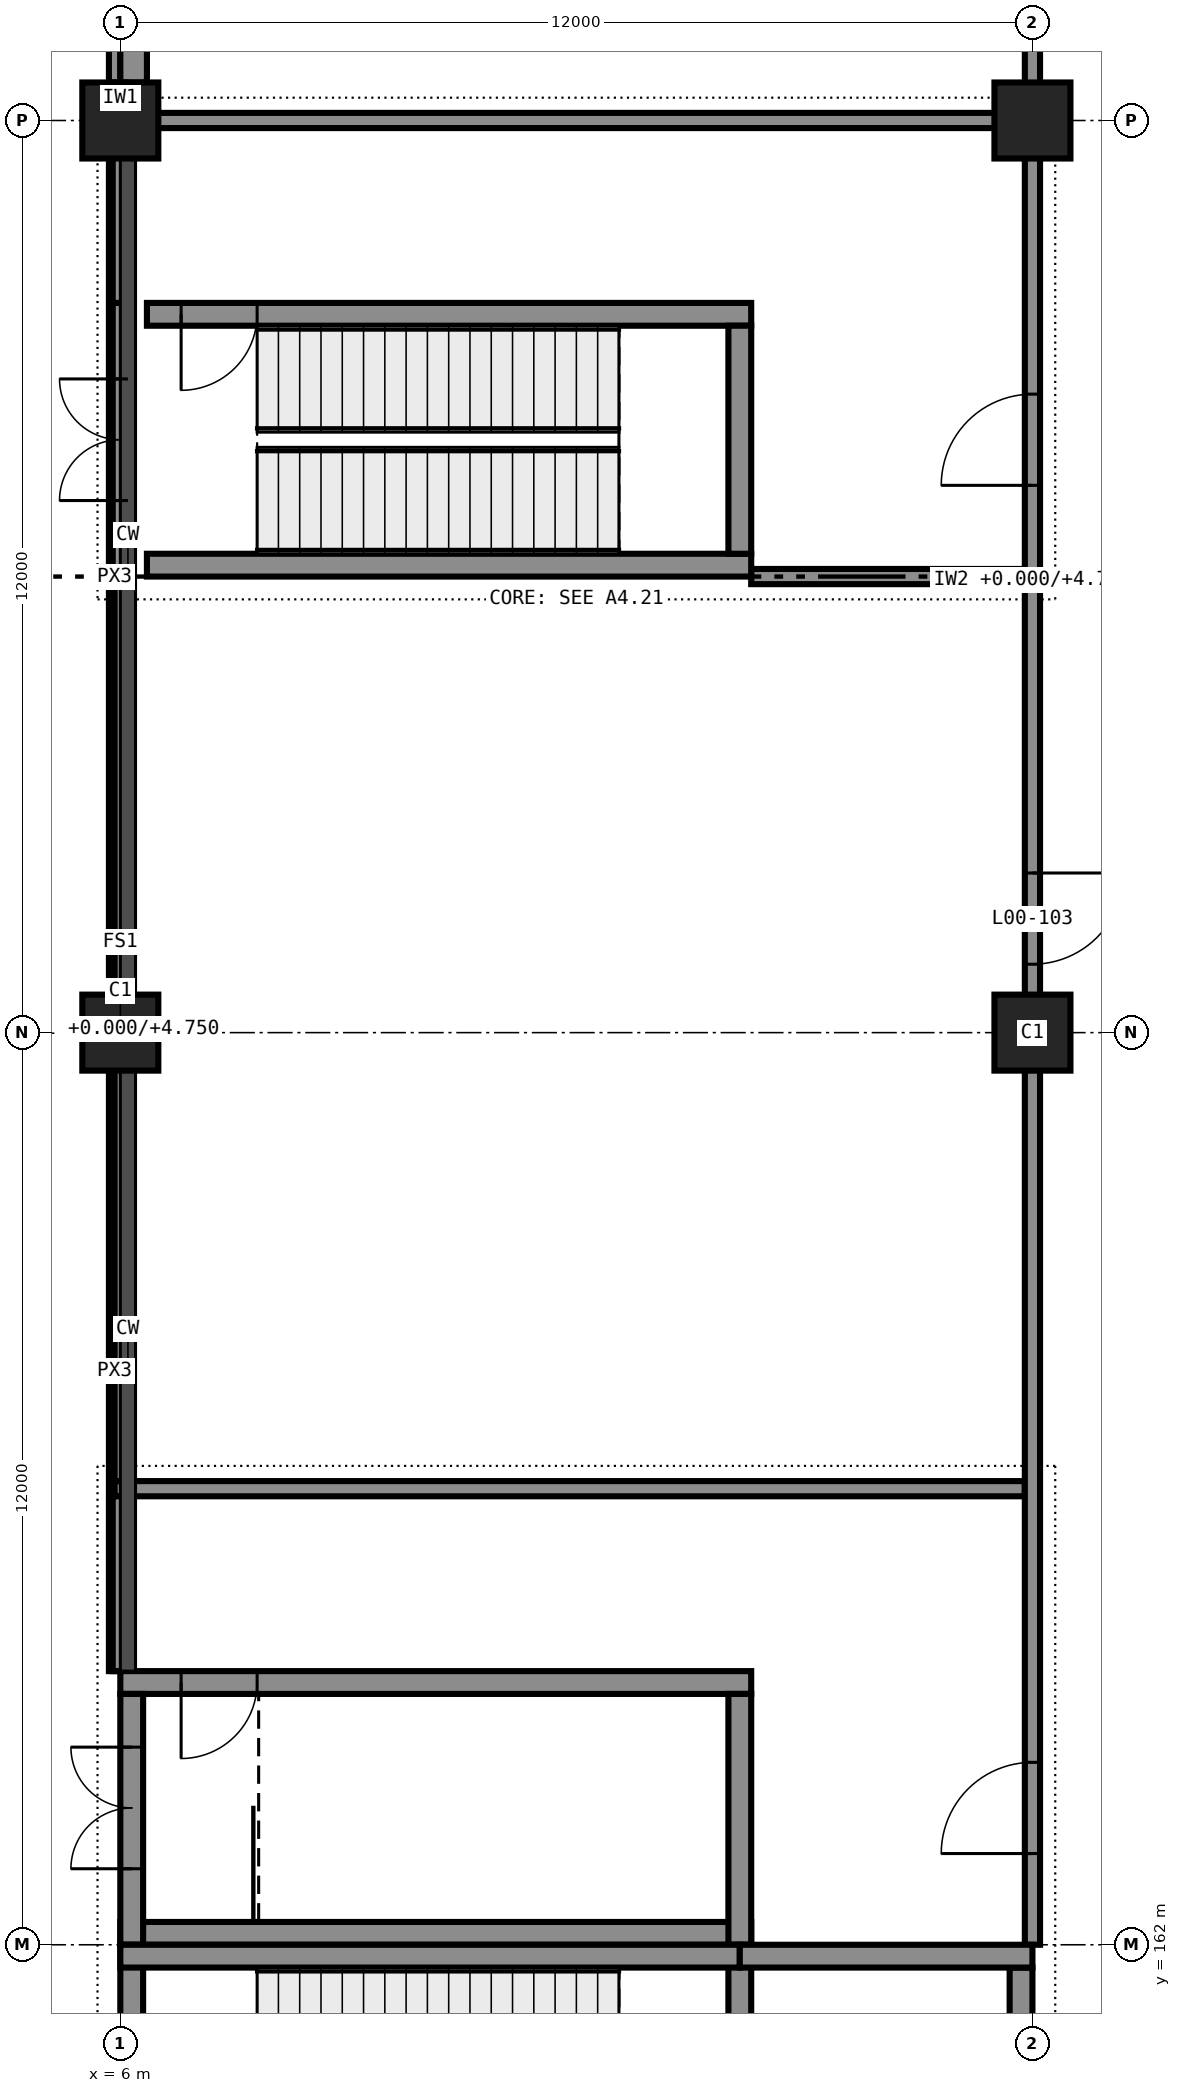
"""IFC4 building model, lengths in metres.
Left out: names, types, materials, properties, quantities, classifications, styles, units other than length and angle.
Written with IfcOpenShell. Run it as: python <this file> out.ifc"""

import sys

from ifc_helpers import new_model, si_unit, direction, frame, frame_2d, origin, origin_2d, place, context, subcontext, project, spatial, rectangle, extrude, element, fill, save


model = new_model("IFC4")
c1 = context("Model", 3, precision=1e-05, world=origin(), true_north=direction((0.0, 1.0)))
c2 = subcontext(c1, "Body", "Model", "MODEL_VIEW")
j1 = project(units=[si_unit("LENGTHUNIT", "METRE"), si_unit("PLANEANGLEUNIT", "RADIAN")], contexts=[c1])
p1 = place(None, origin())
s1 = spatial("IfcSite", under=j1, at=p1, CompositionType="ELEMENT")
p2 = place(p1, origin())
s2 = spatial("IfcBuilding", under=s1, at=p2, CompositionType="ELEMENT")
p3 = place(p2, origin())
s3 = spatial("IfcBuildingStorey", under=s2, at=p3, CompositionType="ELEMENT", Elevation=0.0)
for number, where, z_axis, x_axis in (
    (1, (6.0, 174.0, 0.0), (0.0, 0.0, 1.0), (1.0, 0.0, 0.0)),
    (2, (6.0, 186.0, 0.0), (0.0, 0.0, 1.0), (1.0, 0.0, 0.0)),
    (3, (18.0, 174.0, 0.0), (0.0, 0.0, 1.0), (1.0, 0.0, 0.0)),
    (4, (18.0, 186.0, 0.0), (0.0, 0.0, 1.0), (1.0, 0.0, 0.0)),
):
    element("IfcColumn", number, at=place(p3, frame(where, z_axis=z_axis, x_axis=x_axis)), inside=s3, PredefinedType="COLUMN", context=c2, shape_type="SweptSolid", body=[
        extrude(rectangle(XDim=1.0, YDim=1.0, at=origin_2d()), origin(), (0.0, 0.0, 1.0), 6.0),
    ])
p4 = place(p3, frame((6.0, 162.15, 0.0), z_axis=(0.0, 0.0, 1.0), x_axis=(1.0, 0.0, 0.0)))
e5 = element("IfcWall", 5, at=p4, inside=s3, PredefinedType="SHEAR", context=c2, shape_type="SweptSolid", body=[
    extrude(rectangle(XDim=8.3, YDim=0.3, at=frame_2d((4.15, 0.0))), origin(), (0.0, 0.0, 1.0), 5.75),
])
p5 = place(p3, frame((6.0, 165.45, 0.0), z_axis=(0.0, 0.0, 1.0), x_axis=(1.0, 0.0, 0.0)))
e6 = element("IfcWall", 6, at=p5, inside=s3, PredefinedType="SHEAR", context=c2, shape_type="SweptSolid", body=[
    extrude(rectangle(XDim=8.3, YDim=0.3, at=frame_2d((4.15, 0.0))), origin(), (0.0, 0.0, 1.0), 5.75),
])
p6 = place(p5, frame((0.8, 0.0, 0.0)))
e7 = element("IfcOpeningElement", 7, at=p6, cuts=e6, PredefinedType="OPENING", context=c2, shape_type="SweptSolid", body=[
    extrude(rectangle(XDim=1.0, YDim=2.1, at=frame_2d((0.5, 1.05))), frame((0.0, 0.16, 0.0), z_axis=(0.0, -1.0, 0.0), x_axis=(1.0, 0.0, 0.0)), (0.0, 0.0, 1.0), 0.32),
])
p7 = place(p3, frame((6.15, 162.0, 0.0), z_axis=(0.0, 0.0, 1.0), x_axis=(0.0, 1.0, 0.0)))
e8 = element("IfcWall", 8, at=p7, inside=s3, PredefinedType="SHEAR", context=c2, shape_type="SweptSolid", body=[
    extrude(rectangle(XDim=3.3, YDim=0.3, at=frame_2d((1.65, 0.0))), origin(), (0.0, 0.0, 1.0), 5.75),
])
p8 = place(p7, frame((1.0, 0.0, 0.0)))
e9 = element("IfcOpeningElement", 9, at=p8, cuts=e8, PredefinedType="OPENING", context=c2, shape_type="SweptSolid", body=[
    extrude(rectangle(XDim=1.6, YDim=2.1, at=frame_2d((0.8, 1.05))), frame((0.0, 0.16, 0.0), z_axis=(0.0, -1.0, 0.0), x_axis=(1.0, 0.0, 0.0)), (0.0, 0.0, 1.0), 0.32),
])
p9 = place(p3, frame((14.15, 162.0, 0.0), z_axis=(0.0, 0.0, 1.0), x_axis=(0.0, 1.0, 0.0)))
e10 = element("IfcWall", 10, at=p9, inside=s3, PredefinedType="SHEAR", context=c2, shape_type="SweptSolid", body=[
    extrude(rectangle(XDim=3.3, YDim=0.3, at=frame_2d((1.65, 0.0))), origin(), (0.0, 0.0, 1.0), 5.75),
])
p10 = place(p3, frame((6.35, 180.15, 0.0), z_axis=(0.0, 0.0, 1.0), x_axis=(1.0, 0.0, 0.0)))
e11 = element("IfcWall", 11, at=p10, inside=s3, PredefinedType="SHEAR", context=c2, shape_type="SweptSolid", body=[
    extrude(rectangle(XDim=7.95, YDim=0.3, at=frame_2d((3.975, 0.0))), origin(), (0.0, 0.0, 1.0), 5.75),
])
p11 = place(p3, frame((6.35, 183.45, 0.0), z_axis=(0.0, 0.0, 1.0), x_axis=(1.0, 0.0, 0.0)))
e12 = element("IfcWall", 12, at=p11, inside=s3, PredefinedType="SHEAR", context=c2, shape_type="SweptSolid", body=[
    extrude(rectangle(XDim=7.95, YDim=0.3, at=frame_2d((3.975, 0.0))), origin(), (0.0, 0.0, 1.0), 5.75),
])
p12 = place(p11, frame((0.45, 0.0, 0.0)))
e13 = element("IfcOpeningElement", 13, at=p12, cuts=e12, PredefinedType="OPENING", context=c2, shape_type="SweptSolid", body=[
    extrude(rectangle(XDim=1.0, YDim=2.1, at=frame_2d((0.5, 1.05))), frame((0.0, 0.16, 0.0), z_axis=(0.0, -1.0, 0.0), x_axis=(1.0, 0.0, 0.0)), (0.0, 0.0, 1.0), 0.32),
])
p13 = place(p3, frame((14.15, 180.3, 0.0), z_axis=(0.0, 0.0, 1.0), x_axis=(0.0, 1.0, 0.0)))
e14 = element("IfcWall", 14, at=p13, inside=s3, PredefinedType="SHEAR", context=c2, shape_type="SweptSolid", body=[
    extrude(rectangle(XDim=3.0, YDim=0.3, at=frame_2d((1.5, 0.0))), origin(), (0.0, 0.0, 1.0), 5.75),
])
p14 = place(p3, frame((6.0, 161.85, 0.0), z_axis=(0.0, 0.0, 1.0), x_axis=(1.0, 0.0, 0.0)))
e15 = element("IfcWall", 15, at=p14, inside=s3, PredefinedType="SHEAR", context=c2, shape_type="SweptSolid", body=[
    extrude(rectangle(XDim=8.15, YDim=0.3, at=frame_2d((4.075, 0.0))), origin(), (0.0, 0.0, 1.0), 5.75),
])
p15 = place(p3, frame((14.15, 161.85, 0.0), z_axis=(0.0, 0.0, 1.0), x_axis=(1.0, 0.0, 0.0)))
e16 = element("IfcWall", 16, at=p15, inside=s3, PredefinedType="SHEAR", context=c2, shape_type="SweptSolid", body=[
    extrude(rectangle(XDim=3.85, YDim=0.3, at=frame_2d((1.925, 0.0))), origin(), (0.0, 0.0, 1.0), 5.75),
])
p16 = place(p3, frame((6.15, 158.55, 0.0), z_axis=(0.0, 0.0, 1.0), x_axis=(0.0, 1.0, 0.0)))
e17 = element("IfcWall", 17, at=p16, inside=s3, PredefinedType="SHEAR", context=c2, shape_type="SweptSolid", body=[
    extrude(rectangle(XDim=3.45, YDim=0.3, at=frame_2d((1.725, 0.0))), origin(), (0.0, 0.0, 1.0), 5.75),
])
p17 = place(p16, frame((0.85, 0.0, 0.0)))
e18 = element("IfcOpeningElement", 18, at=p17, cuts=e17, PredefinedType="OPENING", context=c2, shape_type="SweptSolid", body=[
    extrude(rectangle(XDim=1.6, YDim=2.1, at=frame_2d((0.8, 1.05))), frame((0.0, 0.16, 0.0), z_axis=(0.0, -1.0, 0.0), x_axis=(1.0, 0.0, 0.0)), (0.0, 0.0, 1.0), 0.32),
])
p18 = place(p3, frame((17.85, 158.55, 0.0), z_axis=(0.0, 0.0, 1.0), x_axis=(0.0, 1.0, 0.0)))
e19 = element("IfcWall", 19, at=p18, inside=s3, PredefinedType="SHEAR", context=c2, shape_type="SweptSolid", body=[
    extrude(rectangle(XDim=3.15, YDim=0.3, at=frame_2d((1.575, 0.0))), origin(), (0.0, 0.0, 1.0), 5.75),
])
p19 = place(p18, frame((1.15, 0.0, 0.0)))
e20 = element("IfcOpeningElement", 20, at=p19, cuts=e19, PredefinedType="OPENING", context=c2, shape_type="SweptSolid", body=[
    extrude(rectangle(XDim=1.0, YDim=2.1, at=frame_2d((0.5, 1.05))), frame((0.0, 0.16, 0.0), z_axis=(0.0, -1.0, 0.0), x_axis=(1.0, 0.0, 0.0)), (0.0, 0.0, 1.0), 0.32),
])
p20 = place(p3, frame((14.15, 158.7, 0.0), z_axis=(0.0, 0.0, 1.0), x_axis=(0.0, 1.0, 0.0)))
e21 = element("IfcWall", 21, at=p20, inside=s3, PredefinedType="SHEAR", context=c2, shape_type="SweptSolid", body=[
    extrude(rectangle(XDim=3.3, YDim=0.3, at=frame_2d((1.65, 0.0))), origin(), (0.0, 0.0, 1.0), 5.75),
])
p21 = place(p3, frame((6.175, 197.5, 0.0), z_axis=(0.0, 0.0, 1.0), x_axis=(0.0, -1.0, 0.0)))
e22 = element("IfcWall", 22, at=p21, inside=s3, PredefinedType="STANDARD", context=c2, shape_type="SweptSolid", body=[
    extrude(rectangle(XDim=11.0, YDim=0.35, at=frame_2d((5.5, 0.0))), origin(), (0.0, 0.0, 1.0), 4.75),
])
p22 = place(p21, frame((8.1, 0.0, 0.45)))
e23 = element("IfcOpeningElement", 23, at=p22, cuts=e22, PredefinedType="OPENING", context=c2, shape_type="SweptSolid", body=[
    extrude(rectangle(XDim=2.4, YDim=3.0, at=frame_2d((1.2, 1.5))), frame((0.0, 0.185, 0.0), z_axis=(0.0, -1.0, 0.0), x_axis=(1.0, 0.0, 0.0)), (0.0, 0.0, 1.0), 0.37),
])
p23 = place(p21, frame((3.1, 0.0, 0.0)))
e24 = element("IfcOpeningElement", 24, at=p23, cuts=e22, PredefinedType="OPENING", context=c2, shape_type="SweptSolid", body=[
    extrude(rectangle(XDim=4.8, YDim=2.4, at=frame_2d((2.4, 1.2))), frame((0.0, 0.185, 0.0), z_axis=(0.0, -1.0, 0.0), x_axis=(1.0, 0.0, 0.0)), (0.0, 0.0, 1.0), 0.37),
])
for number, where, z_axis, x_axis in (
    (25, (5.925, 197.5, 5.75), (0.0, 0.0, 1.0), (0.0, -1.0, 0.0)),
    (26, (5.925, 185.5, 5.75), (0.0, 0.0, 1.0), (0.0, -1.0, 0.0)),
):
    element("IfcWall", number, at=place(p3, frame(where, z_axis=z_axis, x_axis=x_axis)), inside=s3, PredefinedType="STANDARD", context=c2, shape_type="SweptSolid", body=[
        extrude(rectangle(XDim=11.0, YDim=0.15, at=frame_2d((5.5, 0.0))), origin(), (0.0, 0.0, 1.0), 0.25),
    ])
p24 = place(p3, frame((5.925, 173.5, 5.75), z_axis=(0.0, 0.0, 1.0), x_axis=(0.0, -1.0, 0.0)))
e27 = element("IfcWall", 27, at=p24, inside=s3, PredefinedType="STANDARD", context=c2, shape_type="SweptSolid", body=[
    extrude(rectangle(XDim=7.9, YDim=0.15, at=frame_2d((3.95, 0.0))), origin(), (0.0, 0.0, 1.0), 0.25),
])
p25 = place(p3, frame((5.925, 168.0, 0.0), z_axis=(0.0, 0.0, 1.0), x_axis=(1.0, 0.0, 0.0)))
e28 = element("IfcWall", 28, at=p25, inside=s3, PredefinedType="PARTITIONING", context=c2, shape_type="SweptSolid", body=[
    extrude(rectangle(XDim=11.975, YDim=0.2, at=frame_2d((5.987, 0.0))), origin(), (0.0, 0.0, 1.0), 5.75),
])
p26 = place(p3, frame((14.3, 180.0, 0.0), z_axis=(0.0, 0.0, 1.0), x_axis=(1.0, 0.0, 0.0)))
e29 = element("IfcWall", 29, at=p26, inside=s3, PredefinedType="PARTITIONING", context=c2, shape_type="SweptSolid", body=[
    extrude(rectangle(XDim=3.6, YDim=0.2, at=frame_2d((1.8, 0.0))), origin(), (0.0, 0.0, 1.0), 5.75),
])
p27 = place(p3, frame((5.925, 186.0, 0.0), z_axis=(0.0, 0.0, 1.0), x_axis=(1.0, 0.0, 0.0)))
e30 = element("IfcWall", 30, at=p27, inside=s3, PredefinedType="PARTITIONING", context=c2, shape_type="SweptSolid", body=[
    extrude(rectangle(XDim=11.975, YDim=0.2, at=frame_2d((5.987, 0.0))), origin(), (0.0, 0.0, 1.0), 4.75),
])
p28 = place(p3, frame((6.0, 165.6, 0.0), z_axis=(0.0, 0.0, 1.0), x_axis=(0.0, 1.0, 0.0)))
e31 = element("IfcWall", 31, at=p28, inside=s3, PredefinedType="PARTITIONING", context=c2, shape_type="SweptSolid", body=[
    extrude(rectangle(XDim=2.3, YDim=0.2, at=frame_2d((1.15, 0.0))), origin(), (0.0, 0.0, 1.0), 4.75),
])
p29 = place(p3, frame((6.0, 168.1, 0.0), z_axis=(0.0, 0.0, 1.0), x_axis=(0.0, 1.0, 0.0)))
e32 = element("IfcWall", 32, at=p29, inside=s3, PredefinedType="PARTITIONING", context=c2, shape_type="SweptSolid", body=[
    extrude(rectangle(XDim=11.9, YDim=0.15, at=frame_2d((5.95, 0.0))), origin(), (0.0, 0.0, 1.0), 4.75),
])
p30 = place(p3, frame((6.0, 180.0, 0.0), z_axis=(0.0, 0.0, 1.0), x_axis=(0.0, 1.0, 0.0)))
e33 = element("IfcWall", 33, at=p30, inside=s3, PredefinedType="PARTITIONING", context=c2, shape_type="SweptSolid", body=[
    extrude(rectangle(XDim=3.6, YDim=0.2, at=frame_2d((1.8, 0.0))), origin(), (0.0, 0.0, 1.0), 4.75),
])
p31 = place(p30, frame((1.0, 0.0, 0.0)))
e34 = element("IfcOpeningElement", 34, at=p31, cuts=e33, PredefinedType="OPENING", context=c2, shape_type="SweptSolid", body=[
    extrude(rectangle(XDim=1.6, YDim=2.1, at=frame_2d((0.8, 1.05))), frame((0.0, 0.11, 0.0), z_axis=(0.0, -1.0, 0.0), x_axis=(1.0, 0.0, 0.0)), (0.0, 0.0, 1.0), 0.22),
])
p32 = place(p3, frame((6.0, 183.6, 0.0), z_axis=(0.0, 0.0, 1.0), x_axis=(0.0, 1.0, 0.0)))
e35 = element("IfcWall", 35, at=p32, inside=s3, PredefinedType="PARTITIONING", context=c2, shape_type="SweptSolid", body=[
    extrude(rectangle(XDim=2.3, YDim=0.2, at=frame_2d((1.15, 0.0))), origin(), (0.0, 0.0, 1.0), 4.75),
])
p33 = place(p3, frame((6.0, 186.1, 0.0), z_axis=(0.0, 0.0, 1.0), x_axis=(0.0, 1.0, 0.0)))
e36 = element("IfcWall", 36, at=p33, inside=s3, PredefinedType="PARTITIONING", context=c2, shape_type="SweptSolid", body=[
    extrude(rectangle(XDim=0.4, YDim=0.15, at=frame_2d((0.2, 0.0))), origin(), (0.0, 0.0, 1.0), 5.75),
])
p34 = place(p3, frame((18.0, 162.0, 0.0), z_axis=(0.0, 0.0, 1.0), x_axis=(0.0, 1.0, 0.0)))
e37 = element("IfcWall", 37, at=p34, inside=s3, PredefinedType="PARTITIONING", context=c2, shape_type="SweptSolid", body=[
    extrude(rectangle(XDim=35.9, YDim=0.2, at=frame_2d((17.95, 0.0))), origin(), (0.0, 0.0, 1.0), 4.75),
])
p35 = place(p34, frame((1.2, 0.0, 0.0)))
e38 = element("IfcOpeningElement", 38, at=p35, cuts=e37, PredefinedType="OPENING", context=c2, shape_type="SweptSolid", body=[
    extrude(rectangle(XDim=1.2, YDim=2.1, at=frame_2d((0.6, 1.05))), frame((0.0, 0.11, 0.0), z_axis=(0.0, -1.0, 0.0), x_axis=(1.0, 0.0, 0.0)), (0.0, 0.0, 1.0), 0.22),
])
p36 = place(p34, frame((12.9, 0.0, 0.0)))
e39 = element("IfcOpeningElement", 39, at=p36, cuts=e37, PredefinedType="OPENING", context=c2, shape_type="SweptSolid", body=[
    extrude(rectangle(XDim=1.2, YDim=2.1, at=frame_2d((0.6, 1.05))), frame((0.0, 0.11, 0.0), z_axis=(0.0, -1.0, 0.0), x_axis=(1.0, 0.0, 0.0)), (0.0, 0.0, 1.0), 0.22),
])
p37 = place(p34, frame((19.2, 0.0, 0.0)))
e40 = element("IfcOpeningElement", 40, at=p37, cuts=e37, PredefinedType="OPENING", context=c2, shape_type="SweptSolid", body=[
    extrude(rectangle(XDim=1.2, YDim=2.1, at=frame_2d((0.6, 1.05))), frame((0.0, 0.11, 0.0), z_axis=(0.0, -1.0, 0.0), x_axis=(1.0, 0.0, 0.0)), (0.0, 0.0, 1.0), 0.22),
])
p38 = place(p34, frame((29.4, 0.0, 0.0)))
e41 = element("IfcOpeningElement", 41, at=p38, cuts=e37, PredefinedType="OPENING", context=c2, shape_type="SweptSolid", body=[
    extrude(rectangle(XDim=1.2, YDim=2.1, at=frame_2d((0.6, 1.05))), frame((0.0, 0.11, 0.0), z_axis=(0.0, -1.0, 0.0), x_axis=(1.0, 0.0, 0.0)), (0.0, 0.0, 1.0), 0.22),
])
p39 = place(p8, origin())
e42 = element("IfcDoor", 42, at=p39, inside=s3, OperationType="DOUBLE_DOOR_SINGLE_SWING", PredefinedType="DOOR", context=c2, shape_type="SweptSolid", body=[
    extrude(rectangle(XDim=1.6, YDim=2.1, at=frame_2d((0.8, 1.05))), frame((0.0, 0.025, 0.0), z_axis=(0.0, -1.0, 0.0), x_axis=(1.0, 0.0, 0.0)), (0.0, 0.0, 1.0), 0.05),
])
fill(e9, e42)
p40 = place(p35, origin())
e43 = element("IfcDoor", 43, at=p40, inside=s3, OperationType="SINGLE_SWING_RIGHT", PredefinedType="DOOR", context=c2, shape_type="SweptSolid", body=[
    extrude(rectangle(XDim=1.2, YDim=2.1, at=frame_2d((0.6, 1.05))), frame((0.0, 0.025, 0.0), z_axis=(0.0, -1.0, 0.0), x_axis=(1.0, 0.0, 0.0)), (0.0, 0.0, 1.0), 0.05),
])
fill(e38, e43)
p41 = place(p6, frame((1.0, 0.0, 0.0), z_axis=(0.0, 0.0, 1.0), x_axis=(-1.0, 0.0, 0.0)))
e44 = element("IfcDoor", 44, at=p41, inside=s3, OperationType="SINGLE_SWING_LEFT", PredefinedType="DOOR", context=c2, shape_type="SweptSolid", body=[
    extrude(rectangle(XDim=1.0, YDim=2.1, at=frame_2d((0.5, 1.05))), frame((0.0, 0.025, 0.0), z_axis=(0.0, -1.0, 0.0), x_axis=(1.0, 0.0, 0.0)), (0.0, 0.0, 1.0), 0.05),
])
fill(e7, e44)
p42 = place(p36, frame((1.2, 0.0, 0.0), z_axis=(0.0, 0.0, 1.0), x_axis=(-1.0, 0.0, 0.0)))
e45 = element("IfcDoor", 45, at=p42, inside=s3, OperationType="SINGLE_SWING_RIGHT", PredefinedType="DOOR", context=c2, shape_type="SweptSolid", body=[
    extrude(rectangle(XDim=1.2, YDim=2.1, at=frame_2d((0.6, 1.05))), frame((0.0, 0.025, 0.0), z_axis=(0.0, -1.0, 0.0), x_axis=(1.0, 0.0, 0.0)), (0.0, 0.0, 1.0), 0.05),
])
fill(e39, e45)
p43 = place(p31, origin())
e46 = element("IfcDoor", 46, at=p43, inside=s3, OperationType="DOUBLE_DOOR_SINGLE_SWING", PredefinedType="DOOR", context=c2, shape_type="SweptSolid", body=[
    extrude(rectangle(XDim=1.6, YDim=2.1, at=frame_2d((0.8, 1.05))), frame((0.0, 0.025, 0.0), z_axis=(0.0, -1.0, 0.0), x_axis=(1.0, 0.0, 0.0)), (0.0, 0.0, 1.0), 0.05),
])
fill(e34, e46)
p44 = place(p37, origin())
e47 = element("IfcDoor", 47, at=p44, inside=s3, OperationType="SINGLE_SWING_RIGHT", PredefinedType="DOOR", context=c2, shape_type="SweptSolid", body=[
    extrude(rectangle(XDim=1.2, YDim=2.1, at=frame_2d((0.6, 1.05))), frame((0.0, 0.025, 0.0), z_axis=(0.0, -1.0, 0.0), x_axis=(1.0, 0.0, 0.0)), (0.0, 0.0, 1.0), 0.05),
])
fill(e40, e47)
p45 = place(p12, frame((1.0, 0.0, 0.0), z_axis=(0.0, 0.0, 1.0), x_axis=(-1.0, 0.0, 0.0)))
e48 = element("IfcDoor", 48, at=p45, inside=s3, OperationType="SINGLE_SWING_LEFT", PredefinedType="DOOR", context=c2, shape_type="SweptSolid", body=[
    extrude(rectangle(XDim=1.0, YDim=2.1, at=frame_2d((0.5, 1.05))), frame((0.0, 0.025, 0.0), z_axis=(0.0, -1.0, 0.0), x_axis=(1.0, 0.0, 0.0)), (0.0, 0.0, 1.0), 0.05),
])
fill(e13, e48)
save(model, sys.argv[1])
